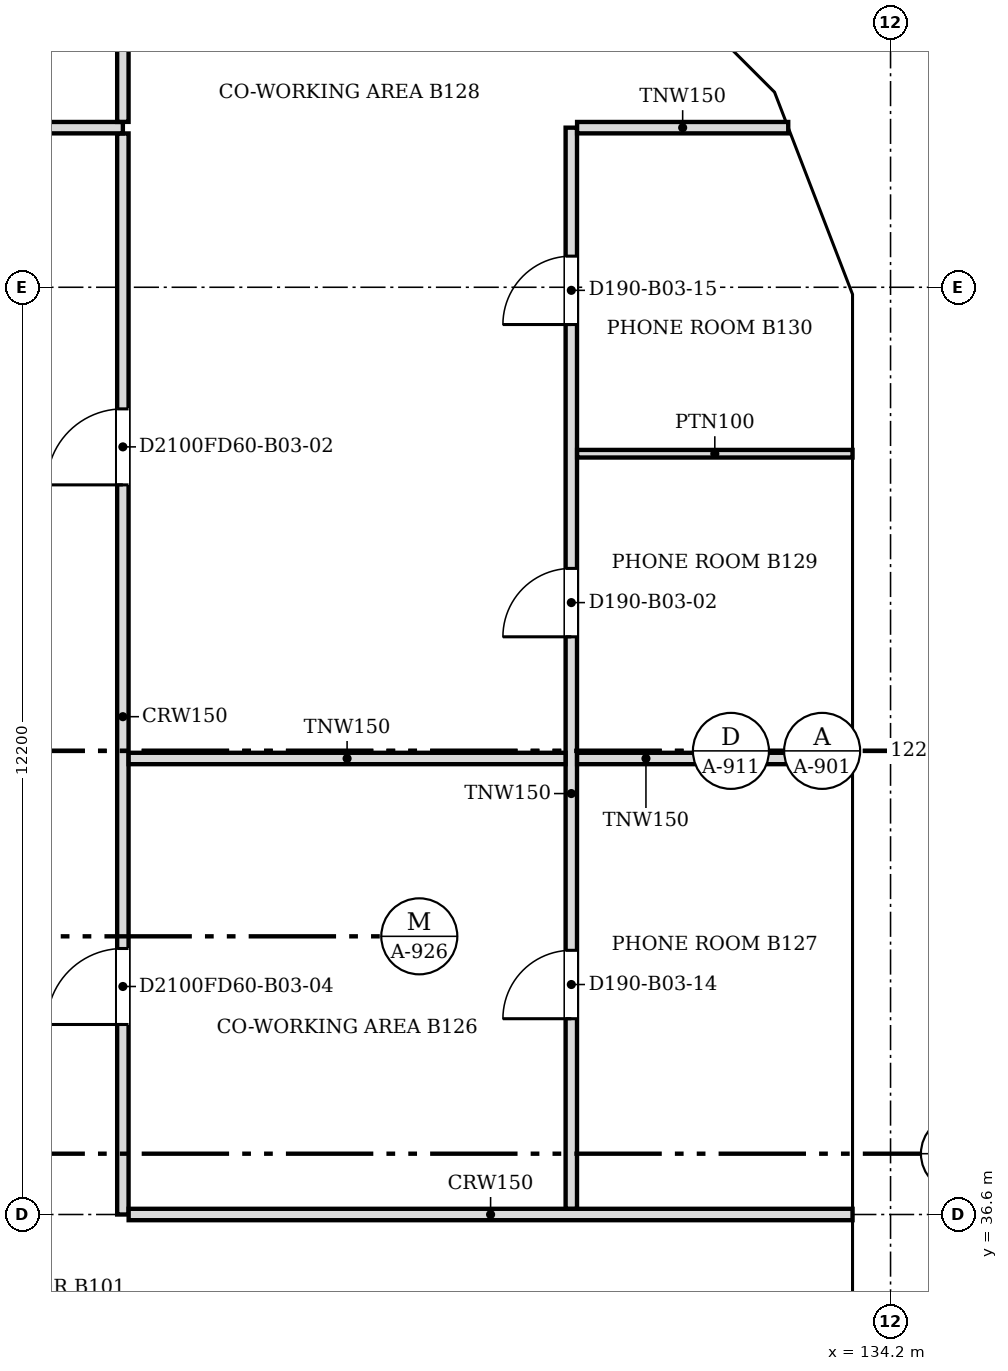
"""IFC4 building model, lengths in metres.
Left out: names, types, materials, properties, quantities, classifications, styles, units other than length and angle.
Written with IfcOpenShell. Run it as: python <this file> out.ifc"""

import sys

from ifc_helpers import new_model, si_unit, direction, frame, frame_2d, origin, place, context, subcontext, project, spatial, polyline, rectangle, outline, extrude, faceted_brep, source, transform, mapped, element, fill, save


model = new_model("IFC4")
c1 = context("Model", 3, precision=1e-05, world=origin(), true_north=direction((0.0, 1.0)))
c2 = subcontext(c1, "Body", "Model", "MODEL_VIEW")
j1 = project(units=[si_unit("LENGTHUNIT", "METRE"), si_unit("PLANEANGLEUNIT", "RADIAN")], contexts=[c1])
p1 = place(None, origin())
s1 = spatial("IfcSite", under=j1, at=p1, CompositionType="ELEMENT")
p2 = place(p1, origin())
s2 = spatial("IfcBuilding", under=s1, at=p2, CompositionType="ELEMENT")
p3 = place(p2, frame((0.0, 0.0, 33.4)))
s3 = spatial("IfcBuildingStorey", under=s2, at=p3, CompositionType="ELEMENT", Elevation=33.4)
m1 = source(origin(), c2, "Body", "SweptSolid", [
    extrude(outline(polyline([(3.05, 0.0), (6.1, 3.8), (3.05, 7.6), (0.0, 3.8), (3.05, 0.0)])), frame((0.0, 0.25, 0.0), z_axis=(0.0, -1.0, 0.0), x_axis=(1.0, 0.0, 0.0)), (0.0, 0.0, 1.0), 0.5),
])
p4 = place(p3, frame((133.95, 30.5, -3.8), z_axis=(0.0, 0.0, 1.0), x_axis=(0.0, 1.0, 0.0)))
e1 = element("IfcWall", 1, at=p4, inside=s3, PredefinedType="SOLIDWALL", context=c2, shape_type="MappedRepresentation", body=[
    mapped(m1, transform((0.0, 0.0, 0.0), scale=1.0)),
])
m2 = source(origin(), c2, "Body", "SweptSolid", [
    extrude(outline(polyline([(3.05, 0.399), (5.78, 3.8), (3.05, 7.2), (0.321, 3.8), (3.05, 0.399)])), frame((0.0, 0.26, 0.0), z_axis=(0.0, -1.0, 0.0), x_axis=(1.0, 0.0, 0.0)), (0.0, 0.0, 1.0), 0.52),
])
p5 = place(p4, origin())
e2 = element("IfcOpeningElement", 2, at=p5, cuts=e1, PredefinedType="OPENING", context=c2, shape_type="MappedRepresentation", body=[
    mapped(m2, transform((0.0, 0.0, 0.0), scale=1.0)),
])
m3 = source(origin(), c2, "Body", "Brep", [
    faceted_brep([(3.05, -0.25, 0.0), (6.1, -0.25, 3.8), (6.1, -0.25, 3.8), (3.05, -0.25, 7.6), (0.0, -0.25, 3.8), (0.0, 0.25, 3.8), (3.05, 0.25, 7.6), (6.1, 0.25, 3.8), (6.1, 0.25, 3.8), (3.05, 0.25, 0.0)], [[[0, 1, 2, 3, 4]], [[5, 6, 7, 8, 9]], [[9, 8, 1, 0]], [[7, 6, 3, 2]], [[6, 5, 4, 3]], [[5, 9, 0, 4]], [[1, 8, 7, 2]]]),
])
p6 = place(p3, frame((133.95, 36.6, -3.8), z_axis=(0.0, 0.0, 1.0), x_axis=(0.0, 1.0, 0.0)))
e3 = element("IfcWall", 3, at=p6, inside=s3, PredefinedType="SOLIDWALL", context=c2, shape_type="MappedRepresentation", body=[
    mapped(m3, transform((0.0, 0.0, 0.0), scale=1.0)),
])
p7 = place(p6, origin())
e4 = element("IfcOpeningElement", 4, at=p7, cuts=e3, PredefinedType="OPENING", context=c2, shape_type="MappedRepresentation", body=[
    mapped(m2, transform((0.0, 0.0, 0.0), scale=1.0)),
])
m4 = source(origin(), c2, "Body", "Brep", [
    faceted_brep([(3.05, -0.25, 0.0), (6.053, -0.25, 3.8), (3.05, -0.25, 7.6), (0.0, -0.25, 3.8), (0.0, 0.25, 3.8), (3.05, 0.25, 7.6), (6.007, 0.25, 3.859), (6.007, 0.25, 3.741), (3.05, 0.25, 0.0), (6.053, 0.0, 3.8)], [[[0, 1, 2, 3]], [[4, 5, 6, 7, 8]], [[8, 7, 9, 1, 0]], [[6, 5, 2, 1, 9]], [[5, 4, 3, 2]], [[4, 8, 0, 3]], [[9, 7, 6]]]),
])
p8 = place(p3, frame((133.95, 42.7, -3.8), z_axis=(0.0, 0.0, 1.0), x_axis=(0.0, 1.0, 0.0)))
e5 = element("IfcWall", 5, at=p8, inside=s3, PredefinedType="SOLIDWALL", context=c2, shape_type="MappedRepresentation", body=[
    mapped(m4, transform((0.0, 0.0, 0.0), scale=1.0)),
])
m5 = source(origin(), c2, "Body", "SweptSolid", [
    extrude(outline(polyline([(3.049, 0.401), (5.735, 3.8), (3.049, 7.199), (0.321, 3.8), (3.049, 0.401)])), frame((0.0, 0.26, 0.0), z_axis=(0.0, -1.0, 0.0), x_axis=(1.0, 0.0, 0.0)), (0.0, 0.0, 1.0), 0.52),
])
p9 = place(p8, origin())
e6 = element("IfcOpeningElement", 6, at=p9, cuts=e5, PredefinedType="OPENING", context=c2, shape_type="MappedRepresentation", body=[
    mapped(m5, transform((0.0, 0.0, 0.0), scale=1.0)),
])
m6 = source(origin(), c2, "Body", "Brep", [
    faceted_brep([(2.95, -0.25, 0.0), (3.003, -0.25, 0.068), (3.003, -0.25, 7.531), (2.95, -0.25, 7.6), (0.0, -0.25, 3.8), (0.047, 0.25, 3.86), (2.898, 0.25, 7.532), (2.898, 0.25, 0.068), (0.047, 0.25, 3.74), (2.95, 0.0, 0.0), (2.95, 0.0, 7.6), (0.0, 0.0, 3.8)], [[[0, 1, 2, 3, 4]], [[5, 6, 7, 8]], [[1, 0, 9]], [[10, 3, 2]], [[6, 5, 11, 4, 3, 10]], [[8, 7, 9, 0, 4, 11]], [[8, 11, 5]], [[1, 9, 7, 6, 10, 2]]]),
])
p10 = place(p3, frame((133.95, 48.753, -3.8), z_axis=(0.0, 0.0, 1.0), x_axis=(-0.359855894603, 0.933007896601, 0.0)))
e7 = element("IfcWall", 7, at=p10, inside=s3, PredefinedType="SOLIDWALL", context=c2, shape_type="MappedRepresentation", body=[
    mapped(m6, transform((0.0, 0.0, 0.0), scale=1.0)),
])
m7 = source(origin(), c2, "Body", "SweptSolid", [
    extrude(outline(polyline([(2.75, 6.935), (0.316, 3.8), (2.75, 0.665), (2.75, 6.935)])), frame((0.0, 0.26, 0.0), z_axis=(0.0, -1.0, 0.0), x_axis=(1.0, 0.0, 0.0)), (0.0, 0.0, 1.0), 0.52),
])
p11 = place(p10, origin())
e8 = element("IfcOpeningElement", 8, at=p11, cuts=e7, PredefinedType="OPENING", context=c2, shape_type="MappedRepresentation", body=[
    mapped(m7, transform((0.0, 0.0, 0.0), scale=1.0)),
])
m8 = source(origin(), c2, "Body", "Brep", [
    faceted_brep([(0.053, -0.25, 0.0), (2.997, -0.25, 3.8), (0.053, -0.25, 7.6), (0.0, -0.25, 7.532), (0.0, -0.25, 0.068), (0.106, 0.25, 7.531), (2.944, 0.25, 3.868), (2.944, 0.25, 3.732), (0.106, 0.25, 0.068), (2.997, 0.0, 3.8), (0.053, 0.0, 0.0), (0.053, 0.0, 7.6)], [[[0, 1, 2, 3, 4]], [[5, 6, 7, 8]], [[8, 7, 9, 1, 0, 10]], [[6, 5, 11, 2, 1, 9]], [[3, 2, 11]], [[10, 0, 4]], [[8, 10, 4, 3, 11, 5]], [[9, 7, 6]]]),
])
p12 = place(p3, frame((132.926, 51.469, -3.8), z_axis=(0.0, 0.0, 1.0), x_axis=(-0.707066050402, 0.707147509625, 0.0)))
e9 = element("IfcWall", 9, at=p12, inside=s3, PredefinedType="SOLIDWALL", context=c2, shape_type="MappedRepresentation", body=[
    mapped(m8, transform((0.0, 0.0, 0.0), scale=1.0)),
])
m9 = source(origin(), c2, "Body", "SweptSolid", [
    extrude(outline(polyline([(0.253, 0.666), (2.681, 3.8), (0.253, 6.934), (0.253, 0.666)])), frame((0.0, 0.26, 0.0), z_axis=(0.0, -1.0, 0.0), x_axis=(1.0, 0.0, 0.0)), (0.0, 0.0, 1.0), 0.52),
])
p13 = place(p12, origin())
e10 = element("IfcOpeningElement", 10, at=p13, cuts=e9, PredefinedType="OPENING", context=c2, shape_type="MappedRepresentation", body=[
    mapped(m9, transform((0.0, 0.0, 0.0), scale=1.0)),
])
p14 = place(p2, frame((0.0, 0.0, 37.2)))
s4 = spatial("IfcBuildingStorey", under=s2, at=p14, CompositionType="ELEMENT", Elevation=37.2)
m10 = source(origin(), c2, "Body", "Brep", [
    faceted_brep([(3.05, -0.25, 0.0), (6.1, -0.25, 3.8), (6.1, -0.25, 3.8), (3.05, -0.25, 7.6), (0.0, -0.25, 3.8), (0.0, 0.25, 3.8), (3.05, 0.25, 7.6), (6.1, 0.25, 3.8), (6.1, 0.25, 3.8), (3.05, 0.25, 0.0)], [[[0, 1, 2, 3, 4]], [[5, 6, 7, 8, 9]], [[9, 8, 1, 0]], [[7, 6, 3, 2]], [[6, 5, 4, 3]], [[5, 9, 0, 4]], [[1, 8, 7, 2]]]),
])
p15 = place(p14, frame((133.95, 33.55, -3.8), z_axis=(0.0, 0.0, 1.0), x_axis=(0.0, 1.0, 0.0)))
e11 = element("IfcWall", 11, at=p15, inside=s4, PredefinedType="SOLIDWALL", context=c2, shape_type="MappedRepresentation", body=[
    mapped(m10, transform((0.0, 0.0, 0.0), scale=1.0)),
])
m11 = source(origin(), c2, "Body", "SweptSolid", [
    extrude(outline(polyline([(3.05, 0.399), (5.78, 3.8), (3.05, 7.201), (0.321, 3.8), (3.05, 0.399)])), frame((0.0, 0.26, 0.0), z_axis=(0.0, -1.0, 0.0), x_axis=(1.0, 0.0, 0.0)), (0.0, 0.0, 1.0), 0.52),
])
p16 = place(p15, origin())
e12 = element("IfcOpeningElement", 12, at=p16, cuts=e11, PredefinedType="OPENING", context=c2, shape_type="MappedRepresentation", body=[
    mapped(m11, transform((0.0, 0.0, 0.0), scale=1.0)),
])
m12 = source(origin(), c2, "Body", "SweptSolid", [
    extrude(outline(polyline([(3.05, 0.0), (6.1, 3.8), (3.05, 7.6), (0.0, 3.8), (3.05, 0.0)])), frame((0.0, 0.25, 0.0), z_axis=(0.0, -1.0, 0.0), x_axis=(1.0, 0.0, 0.0)), (0.0, 0.0, 1.0), 0.5),
])
p17 = place(p14, frame((133.95, 39.65, -3.8), z_axis=(0.0, 0.0, 1.0), x_axis=(0.0, 1.0, 0.0)))
e13 = element("IfcWall", 13, at=p17, inside=s4, PredefinedType="SOLIDWALL", context=c2, shape_type="MappedRepresentation", body=[
    mapped(m12, transform((0.0, 0.0, 0.0), scale=1.0)),
])
p18 = place(p17, origin())
e14 = element("IfcOpeningElement", 14, at=p18, cuts=e13, PredefinedType="OPENING", context=c2, shape_type="MappedRepresentation", body=[
    mapped(m11, transform((0.0, 0.0, 0.0), scale=1.0)),
])
m13 = source(origin(), c2, "Body", "Brep", [
    faceted_brep([(3.003, -0.25, 0.0), (3.05, -0.25, 0.06), (3.05, -0.25, 7.54), (3.003, -0.25, 7.6), (0.0, -0.25, 3.8), (0.0, 0.25, 3.8), (2.957, 0.25, 7.541), (2.957, 0.25, 0.059), (3.003, 0.0, 0.0), (3.003, 0.0, 7.6)], [[[0, 1, 2, 3, 4]], [[5, 6, 7]], [[1, 0, 8]], [[9, 3, 2]], [[6, 5, 4, 3, 9]], [[5, 7, 8, 0, 4]], [[1, 8, 7, 6, 9, 2]]]),
])
p19 = place(p14, frame((133.95, 45.75, -3.8), z_axis=(0.0, 0.0, 1.0), x_axis=(0.0, 1.0, 0.0)))
e15 = element("IfcWall", 15, at=p19, inside=s4, PredefinedType="SOLIDWALL", context=c2, shape_type="MappedRepresentation", body=[
    mapped(m13, transform((0.0, 0.0, 0.0), scale=1.0)),
])
m14 = source(origin(), c2, "Body", "SweptSolid", [
    extrude(outline(polyline([(2.803, 6.944), (0.319, 3.8), (2.803, 0.656), (2.803, 6.944)])), frame((0.0, 0.26, 0.0), z_axis=(0.0, -1.0, 0.0), x_axis=(1.0, 0.0, 0.0)), (0.0, 0.0, 1.0), 0.52),
])
p20 = place(p19, origin())
e16 = element("IfcOpeningElement", 16, at=p20, cuts=e15, PredefinedType="OPENING", context=c2, shape_type="MappedRepresentation", body=[
    mapped(m14, transform((0.0, 0.0, 0.0), scale=1.0)),
])
m15 = source(origin(), c2, "Body", "Brep", [
    faceted_brep([(0.047, -0.25, 0.0), (2.997, -0.25, 3.8), (0.047, -0.25, 7.6), (0.0, -0.25, 7.541), (0.0, -0.25, 0.059), (0.093, 0.25, 7.54), (2.944, 0.25, 3.868), (2.944, 0.25, 3.732), (0.093, 0.25, 0.06), (2.997, 0.0, 3.8), (0.047, 0.0, 0.0), (0.047, 0.0, 7.6)], [[[0, 1, 2, 3, 4]], [[5, 6, 7, 8]], [[8, 7, 9, 1, 0, 10]], [[6, 5, 11, 2, 1, 9]], [[3, 2, 11]], [[10, 0, 4]], [[8, 10, 4, 3, 11, 5]], [[9, 7, 6]]]),
])
p21 = place(p14, frame((133.967, 48.71, -3.8), z_axis=(0.0, 0.0, 1.0), x_axis=(-0.359901446078, 0.932990326376, 0.0)))
e17 = element("IfcWall", 17, at=p21, inside=s4, PredefinedType="SOLIDWALL", context=c2, shape_type="MappedRepresentation", body=[
    mapped(m15, transform((0.0, 0.0, 0.0), scale=1.0)),
])
m16 = source(origin(), c2, "Body", "SweptSolid", [
    extrude(outline(polyline([(0.247, 0.665), (2.681, 3.8), (0.247, 6.935), (0.247, 0.665)])), frame((0.0, 0.26, 0.0), z_axis=(0.0, -1.0, 0.0), x_axis=(1.0, 0.0, 0.0)), (0.0, 0.0, 1.0), 0.52),
])
p22 = place(p21, origin())
e18 = element("IfcOpeningElement", 18, at=p22, cuts=e17, PredefinedType="OPENING", context=c2, shape_type="MappedRepresentation", body=[
    mapped(m16, transform((0.0, 0.0, 0.0), scale=1.0)),
])
m17 = source(origin(), c2, "Body", "Brep", [
    faceted_brep([(2.944, -0.25, 0.0), (2.997, -0.25, 0.068), (2.997, -0.25, 7.532), (2.944, -0.25, 7.6), (0.0, -0.25, 3.8), (0.053, 0.25, 3.868), (2.891, 0.25, 7.532), (2.891, 0.25, 0.068), (0.053, 0.25, 3.732), (2.944, 0.0, 0.0), (2.944, 0.0, 7.6), (0.0, 0.0, 3.8)], [[[0, 1, 2, 3, 4]], [[5, 6, 7, 8]], [[1, 0, 9]], [[10, 3, 2]], [[6, 5, 11, 4, 3, 10]], [[8, 7, 9, 0, 4, 11]], [[8, 11, 5]], [[1, 9, 7, 6, 10, 2]]]),
])
p23 = place(p14, frame((132.888, 51.506, -3.8), z_axis=(0.0, 0.0, 1.0), x_axis=(-0.707147509625, 0.707066050402, 0.0)))
e19 = element("IfcWall", 19, at=p23, inside=s4, PredefinedType="SOLIDWALL", context=c2, shape_type="MappedRepresentation", body=[
    mapped(m17, transform((0.0, 0.0, 0.0), scale=1.0)),
])
m18 = source(origin(), c2, "Body", "SweptSolid", [
    extrude(outline(polyline([(2.744, 6.934), (0.316, 3.8), (2.744, 0.667), (2.744, 6.934)])), frame((0.0, 0.26, 0.0), z_axis=(0.0, -1.0, 0.0), x_axis=(1.0, 0.0, 0.0)), (0.0, 0.0, 1.0), 0.52),
])
p24 = place(p23, origin())
e20 = element("IfcOpeningElement", 20, at=p24, cuts=e19, PredefinedType="OPENING", context=c2, shape_type="MappedRepresentation", body=[
    mapped(m18, transform((0.0, 0.0, 0.0), scale=1.0)),
])
p25 = place(p3, frame((124.1, 50.824, 0.0), z_axis=(0.0, 0.0, 1.0), x_axis=(0.0, -1.0, 0.0)))
e21 = element("IfcWall", 21, at=p25, inside=s3, PredefinedType="PARTITIONING", context=c2, shape_type="SweptSolid", body=[
    extrude(rectangle(XDim=14.224, YDim=0.15, at=frame_2d((7.112, 0.0))), origin(), (0.0, 0.0, 1.0), 3.067),
])
m19 = source(origin(), c2, "Body", "SweptSolid", [
    extrude(rectangle(XDim=1.0, YDim=2.1, at=frame_2d((0.5, 1.05))), frame((0.0, 0.085, 0.0), z_axis=(0.0, -1.0, 0.0), x_axis=(1.0, 0.0, 0.0)), (0.0, 0.0, 1.0), 0.17),
])
p26 = place(p25, frame((3.624, 0.0, 0.0)))
e22 = element("IfcOpeningElement", 22, at=p26, cuts=e21, PredefinedType="OPENING", context=c2, shape_type="MappedRepresentation", body=[
    mapped(m19, transform((0.0, 0.0, 0.0), scale=1.0)),
])
p27 = place(p25, frame((10.724, 0.0, 0.0)))
e23 = element("IfcOpeningElement", 23, at=p27, cuts=e21, PredefinedType="OPENING", context=c2, shape_type="MappedRepresentation", body=[
    mapped(m19, transform((0.0, 0.0, 0.0), scale=1.0)),
])
p28 = place(p3, frame((124.176, 36.6, 0.0), z_axis=(0.0, 0.0, 1.0), x_axis=(1.0, 0.0, 0.0)))
e24 = element("IfcWall", 24, at=p28, inside=s3, PredefinedType="PARTITIONING", context=c2, shape_type="SweptSolid", body=[
    extrude(rectangle(XDim=9.524, YDim=0.15, at=frame_2d((4.762, 0.0))), origin(), (0.0, 0.0, 1.0), 3.067),
])
p29 = place(p3, frame((130.0, 50.9, 0.0), z_axis=(0.0, 0.0, 1.0), x_axis=(0.0, -1.0, 0.0)))
e25 = element("IfcWall", 25, at=p29, inside=s3, PredefinedType="PARTITIONING", context=c2, shape_type="SweptSolid", body=[
    extrude(rectangle(XDim=14.224, YDim=0.15, at=frame_2d((7.112, 0.0))), origin(), (0.0, 0.0, 1.0), 3.067),
])
m20 = source(origin(), c2, "Body", "SweptSolid", [
    extrude(rectangle(XDim=0.9, YDim=2.1, at=frame_2d((0.45, 1.05))), frame((0.0, 0.085, 0.0), z_axis=(0.0, -1.0, 0.0), x_axis=(1.0, 0.0, 0.0)), (0.0, 0.0, 1.0), 0.17),
])
p30 = place(p29, frame((5.799, 0.0, 0.0)))
e26 = element("IfcOpeningElement", 26, at=p30, cuts=e25, PredefinedType="OPENING", context=c2, shape_type="MappedRepresentation", body=[
    mapped(m20, transform((0.0, 0.0, 0.0), scale=1.0)),
])
p31 = place(p29, frame((10.824, 0.0, 0.0)))
e27 = element("IfcOpeningElement", 27, at=p31, cuts=e25, PredefinedType="OPENING", context=c2, shape_type="MappedRepresentation", body=[
    mapped(m20, transform((0.0, 0.0, 0.0), scale=1.0)),
])
p32 = place(p29, frame((1.69, 0.0, 0.0)))
e28 = element("IfcOpeningElement", 28, at=p32, cuts=e25, PredefinedType="OPENING", context=c2, shape_type="MappedRepresentation", body=[
    mapped(m20, transform((0.0, 0.0, 0.0), scale=1.0)),
])
p33 = place(p3, frame((124.176, 42.6, 0.0), z_axis=(0.0, 0.0, 1.0), x_axis=(1.0, 0.0, 0.0)))
e29 = element("IfcWall", 29, at=p33, inside=s3, PredefinedType="PARTITIONING", context=c2, shape_type="SweptSolid", body=[
    extrude(rectangle(XDim=5.748, YDim=0.15, at=frame_2d((2.874, 0.0))), origin(), (0.0, 0.0, 1.0), 3.067),
])
p34 = place(p3, frame((130.076, 42.6, 0.0), z_axis=(0.0, 0.0, 1.0), x_axis=(1.0, 0.0, 0.0)))
e30 = element("IfcWall", 30, at=p34, inside=s3, PredefinedType="PARTITIONING", context=c2, shape_type="SweptSolid", body=[
    extrude(rectangle(XDim=3.624, YDim=0.15, at=frame_2d((1.812, 0.0))), origin(), (0.0, 0.0, 1.0), 3.067),
])
p35 = place(p3, frame((130.076, 46.61, 0.0), z_axis=(0.0, 0.0, 1.0), x_axis=(1.0, 0.0, 0.0)))
e31 = element("IfcWall", 31, at=p35, inside=s3, PredefinedType="PARTITIONING", context=c2, shape_type="SweptSolid", body=[
    extrude(rectangle(XDim=3.624, YDim=0.1, at=frame_2d((1.812, 0.0))), origin(), (0.0, 0.0, 1.0), 3.067),
])
p36 = place(p3, frame((108.5, 50.9, 0.0), z_axis=(0.0, 0.0, 1.0), x_axis=(1.0, 0.0, 0.0)))
e32 = element("IfcWall", 32, at=p36, inside=s3, PredefinedType="PARTITIONING", context=c2, shape_type="SweptSolid", body=[
    extrude(rectangle(XDim=15.6, YDim=0.15, at=frame_2d((7.8, 0.0))), origin(), (0.0, 0.0, 1.0), 3.067),
])
p37 = place(p36, frame((7.3, 0.0, 0.0)))
e33 = element("IfcOpeningElement", 33, at=p37, cuts=e32, PredefinedType="OPENING", context=c2, shape_type="MappedRepresentation", body=[
    mapped(m19, transform((0.0, 0.0, 0.0), scale=1.0)),
])
p38 = place(p3, frame((130.076, 50.9, 0.0), z_axis=(0.0, 0.0, 1.0), x_axis=(1.0, 0.0, 0.0)))
e34 = element("IfcWall", 34, at=p38, inside=s3, PredefinedType="PARTITIONING", context=c2, shape_type="SweptSolid", body=[
    extrude(rectangle(XDim=2.778, YDim=0.15, at=frame_2d((1.389, 0.0))), origin(), (0.0, 0.0, 1.0), 3.067),
])
p39 = place(p3, frame((124.1, 50.976, 0.0), z_axis=(0.0, 0.0, 1.0), x_axis=(0.0, 1.0, 0.0)))
e35 = element("IfcWall", 35, at=p39, inside=s3, PredefinedType="PARTITIONING", context=c2, shape_type="SweptSolid", body=[
    extrude(rectangle(XDim=3.424, YDim=0.15, at=frame_2d((1.712, 0.0))), origin(), (0.0, 0.0, 1.0), 3.067),
])
m21 = source(origin(), c2, "Body", "SweptSolid", [
    extrude(rectangle(XDim=0.9, YDim=2.1, at=frame_2d((0.45, 1.05))), frame((0.0, 0.025, 0.0), z_axis=(0.0, -1.0, 0.0), x_axis=(1.0, 0.0, 0.0)), (0.0, 0.0, 1.0), 0.05),
])
p40 = place(p30, origin())
e36 = element("IfcDoor", 36, at=p40, inside=s3, OperationType="SINGLE_SWING_RIGHT", PredefinedType="DOOR", context=c2, shape_type="MappedRepresentation", body=[
    mapped(m21, transform((0.0, 0.0, 0.0), scale=1.0)),
])
fill(e26, e36)
p41 = place(p31, origin())
e37 = element("IfcDoor", 37, at=p41, inside=s3, OperationType="SINGLE_SWING_RIGHT", PredefinedType="DOOR", context=c2, shape_type="MappedRepresentation", body=[
    mapped(m21, transform((0.0, 0.0, 0.0), scale=1.0)),
])
fill(e27, e37)
p42 = place(p32, origin())
e38 = element("IfcDoor", 38, at=p42, inside=s3, OperationType="SINGLE_SWING_RIGHT", PredefinedType="DOOR", context=c2, shape_type="MappedRepresentation", body=[
    mapped(m21, transform((0.0, 0.0, 0.0), scale=1.0)),
])
fill(e28, e38)
m22 = source(origin(), c2, "Body", "SweptSolid", [
    extrude(rectangle(XDim=1.0, YDim=2.1, at=frame_2d((0.5, 1.05))), frame((0.0, 0.025, 0.0), z_axis=(0.0, -1.0, 0.0), x_axis=(1.0, 0.0, 0.0)), (0.0, 0.0, 1.0), 0.05),
])
p43 = place(p26, origin())
e39 = element("IfcDoor", 39, at=p43, inside=s3, OperationType="SINGLE_SWING_RIGHT", PredefinedType="DOOR", context=c2, shape_type="MappedRepresentation", body=[
    mapped(m22, transform((0.0, 0.0, 0.0), scale=1.0)),
])
fill(e22, e39)
p44 = place(p27, origin())
e40 = element("IfcDoor", 40, at=p44, inside=s3, OperationType="SINGLE_SWING_RIGHT", PredefinedType="DOOR", context=c2, shape_type="MappedRepresentation", body=[
    mapped(m22, transform((0.0, 0.0, 0.0), scale=1.0)),
])
fill(e23, e40)
save(model, sys.argv[1])
